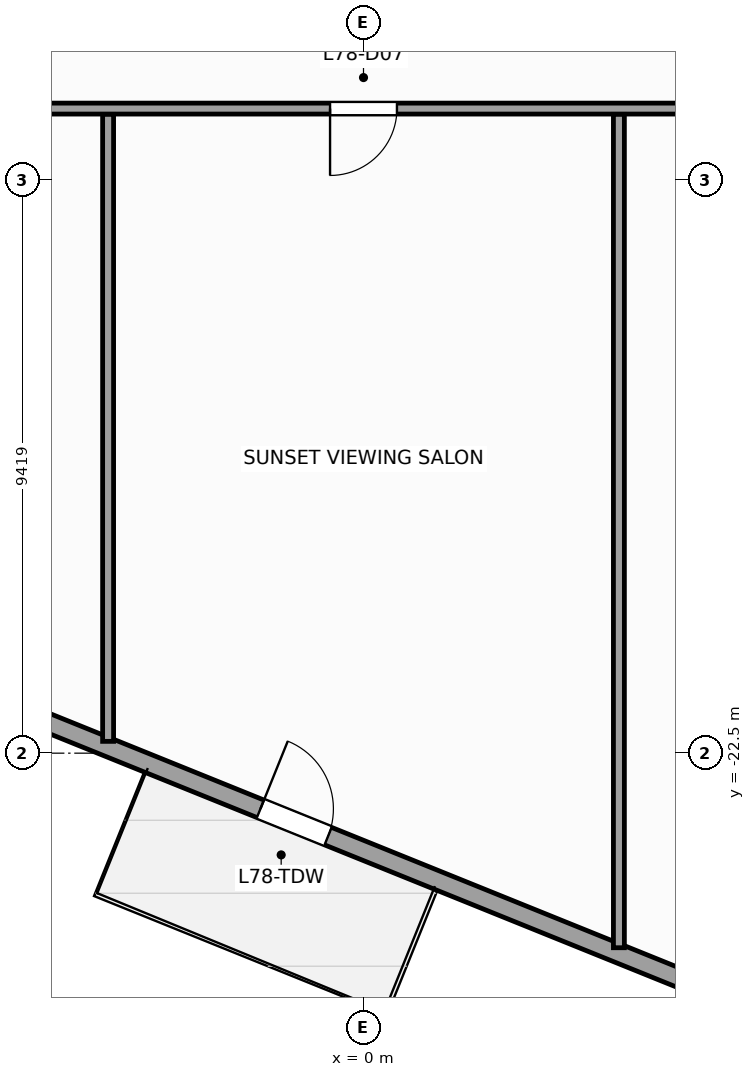
"""IFC4 building model, lengths in metres.
Left out: names, types, materials, properties, quantities, classifications, styles, units other than length and angle.
Written with IfcOpenShell. Run it as: python <this file> out.ifc"""

import sys

from ifc_helpers import new_model, si_unit, direction, frame, frame_2d, origin, place, context, subcontext, project, spatial, rectangle, extrude, source, transform, mapped, element, fill, save


model = new_model("IFC4")
c1 = context("Model", 3, precision=1e-05, world=origin(), true_north=direction((0.0, 1.0)))
c2 = subcontext(c1, "Body", "Model", "MODEL_VIEW")
j1 = project(units=[si_unit("LENGTHUNIT", "METRE"), si_unit("PLANEANGLEUNIT", "RADIAN")], contexts=[c1])
p1 = place(None, origin())
s1 = spatial("IfcSite", under=j1, at=p1, CompositionType="ELEMENT")
p2 = place(p1, origin())
s2 = spatial("IfcBuilding", under=s1, at=p2, CompositionType="ELEMENT")
p3 = place(p2, frame((0.0, 0.0, 316.8)))
s3 = spatial("IfcBuildingStorey", under=s2, at=p3, CompositionType="ELEMENT", Elevation=316.8)
p4 = place(p3, frame((-8.371, -20.718, 0.0), z_axis=(0.0, 0.0, 1.0), x_axis=(0.927186231382, -0.374600710538, 0.0)))
e1 = element("IfcWall", 1, at=p4, inside=s3, PredefinedType="STANDARD", context=c2, shape_type="SweptSolid", body=[
    extrude(rectangle(XDim=16.655, YDim=0.31, at=frame_2d((8.328, 0.0))), origin(), (0.0, 0.0, 1.0), 2.92),
])
p5 = place(p4, frame((7.2, 0.0, 0.0)))
e2 = element("IfcOpeningElement", 2, at=p5, cuts=e1, PredefinedType="OPENING", context=c2, shape_type="SweptSolid", body=[
    extrude(rectangle(XDim=1.2, YDim=2.3, at=frame_2d((0.6, 1.15))), frame((0.0, 0.165, 0.0), z_axis=(0.0, -1.0, 0.0), x_axis=(1.0, 0.0, 0.0)), (0.0, 0.0, 1.0), 0.33),
])
p6 = place(p3, frame((-11.9, -11.9, 0.0), z_axis=(0.0, 0.0, 1.0), x_axis=(1.0, 0.0, 0.0)))
e3 = element("IfcWall", 3, at=p6, inside=s3, PredefinedType="PARTITIONING", context=c2, shape_type="SweptSolid", body=[
    extrude(rectangle(XDim=24.1, YDim=0.18, at=frame_2d((12.05, 0.0))), origin(), (0.0, 0.0, 1.0), 4.5),
])
p7 = place(p6, frame((11.35, 0.0, 0.0)))
e4 = element("IfcOpeningElement", 4, at=p7, cuts=e3, PredefinedType="OPENING", context=c2, shape_type="SweptSolid", body=[
    extrude(rectangle(XDim=1.1, YDim=2.2, at=frame_2d((0.55, 1.1))), frame((0.0, 0.1, 0.0), z_axis=(0.0, -1.0, 0.0), x_axis=(1.0, 0.0, 0.0)), (0.0, 0.0, 1.0), 0.2),
])
p8 = place(p6, frame((3.464, 0.0, 0.0)))
e5 = element("IfcOpeningElement", 5, at=p8, cuts=e3, PredefinedType="OPENING", context=c2, shape_type="SweptSolid", body=[
    extrude(rectangle(XDim=1.1, YDim=2.2, at=frame_2d((0.55, 1.1))), frame((0.0, 0.1, 0.0), z_axis=(0.0, -1.0, 0.0), x_axis=(1.0, 0.0, 0.0)), (0.0, 0.0, 1.0), 0.2),
])
p9 = place(p3, frame((4.2, -11.995, 0.0), z_axis=(0.0, 0.0, 1.0), x_axis=(0.0, -1.0, 0.0)))
e6 = element("IfcWall", 6, at=p9, inside=s3, PredefinedType="PARTITIONING", context=c2, shape_type="SweptSolid", body=[
    extrude(rectangle(XDim=13.705, YDim=0.18, at=frame_2d((6.852, 0.0))), origin(), (0.0, 0.0, 1.0), 4.5),
])
p10 = place(p3, frame((-4.2, -11.995, 0.0), z_axis=(0.0, 0.0, 1.0), x_axis=(0.0, -1.0, 0.0)))
e7 = element("IfcWall", 7, at=p10, inside=s3, PredefinedType="PARTITIONING", context=c2, shape_type="SweptSolid", body=[
    extrude(rectangle(XDim=10.311, YDim=0.18, at=frame_2d((5.155, 0.0))), origin(), (0.0, 0.0, 1.0), 4.5),
])
m1 = source(origin(), c2, "Body", "SweptSolid", [
    extrude(rectangle(XDim=1.2, YDim=2.3, at=frame_2d((0.6, 1.15))), frame((0.0, 0.025, 0.0), z_axis=(0.0, -1.0, 0.0), x_axis=(1.0, 0.0, 0.0)), (0.0, 0.0, 1.0), 0.05),
])
p11 = place(p5, origin())
e8 = element("IfcDoor", 8, at=p11, inside=s3, OperationType="SINGLE_SWING_LEFT", PredefinedType="DOOR", context=c2, shape_type="MappedRepresentation", body=[
    mapped(m1, transform((0.0, 0.0, 0.0), scale=1.0)),
])
fill(e2, e8)
m2 = source(origin(), c2, "Body", "SweptSolid", [
    extrude(rectangle(XDim=1.1, YDim=2.2, at=frame_2d((0.55, 1.1))), frame((0.0, 0.025, 0.0), z_axis=(0.0, -1.0, 0.0), x_axis=(1.0, 0.0, 0.0)), (0.0, 0.0, 1.0), 0.05),
])
p12 = place(p7, frame((1.1, 0.0, 0.0), z_axis=(0.0, 0.0, 1.0), x_axis=(-1.0, 0.0, 0.0)))
e9 = element("IfcDoor", 9, at=p12, inside=s3, OperationType="SINGLE_SWING_LEFT", PredefinedType="DOOR", context=c2, shape_type="MappedRepresentation", body=[
    mapped(m2, transform((0.0, 0.0, 0.0), scale=1.0)),
])
fill(e4, e9)
save(model, sys.argv[1])
